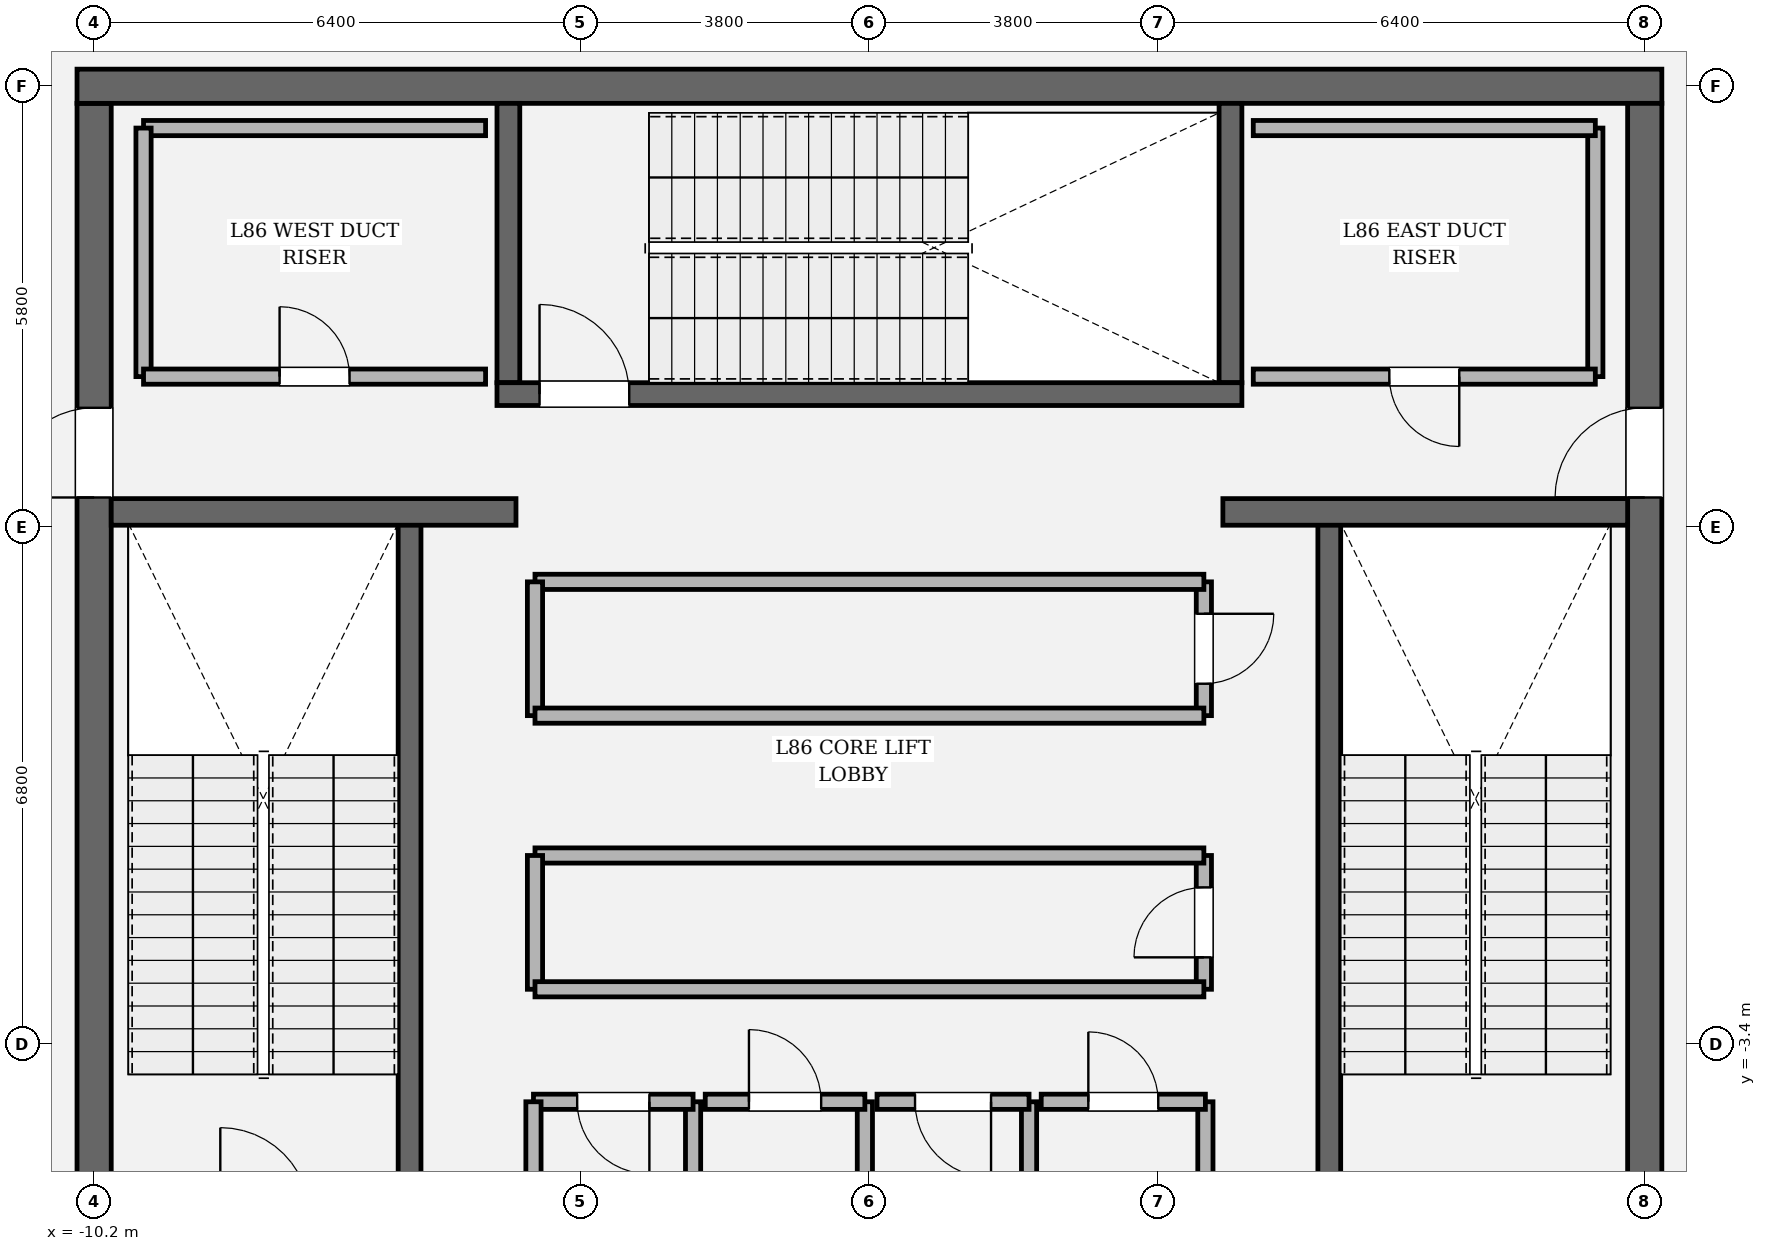
"""IFC4 building model, lengths in metres.
Left out: names, types, materials, properties, quantities, classifications, styles, units other than length and angle.
Written with IfcOpenShell. Run it as: python <this file> out.ifc"""

import sys

from ifc_helpers import new_model, si_unit, direction, frame, frame_2d, origin, place, context, subcontext, project, spatial, rectangle, extrude, element, fill, save


model = new_model("IFC4")
c1 = context("Model", 3, precision=1e-05, world=origin(), true_north=direction((0.0, 1.0)))
c2 = subcontext(c1, "Body", "Model", "MODEL_VIEW")
j1 = project(units=[si_unit("LENGTHUNIT", "METRE"), si_unit("PLANEANGLEUNIT", "RADIAN")], contexts=[c1])
p1 = place(None, origin())
s1 = spatial("IfcSite", under=j1, at=p1, CompositionType="ELEMENT")
p2 = place(p1, origin())
s2 = spatial("IfcBuilding", under=s1, at=p2, CompositionType="ELEMENT")
p3 = place(p2, frame((0.0, 0.0, 366.3)))
s3 = spatial("IfcBuildingStorey", under=s2, at=p3, CompositionType="ELEMENT", Elevation=366.3)
p4 = place(p3, frame((-10.2, -8.975, 0.0), z_axis=(0.0, 0.0, 1.0), x_axis=(0.0, 1.0, 0.0)))
e1 = element("IfcWall", 1, at=p4, inside=s3, PredefinedType="SHEAR", context=c2, shape_type="SweptSolid", body=[
    extrude(rectangle(XDim=17.95, YDim=0.45, at=frame_2d((8.975, 0.0))), origin(), (0.0, 0.0, 1.0), 4.5),
])
p5 = place(p4, frame((12.765, 0.0, 0.0)))
e2 = element("IfcOpeningElement", 2, at=p5, cuts=e1, PredefinedType="OPENING", context=c2, shape_type="SweptSolid", body=[
    extrude(rectangle(XDim=1.18, YDim=2.2, at=frame_2d((0.59, 1.1))), frame((0.0, 0.235, 0.0), z_axis=(0.0, -1.0, 0.0), x_axis=(1.0, 0.0, 0.0)), (0.0, 0.0, 1.0), 0.47),
])
p6 = place(p3, frame((-10.425, 9.2, 0.0), z_axis=(0.0, 0.0, 1.0), x_axis=(1.0, 0.0, 0.0)))
e3 = element("IfcWall", 3, at=p6, inside=s3, PredefinedType="SHEAR", context=c2, shape_type="SweptSolid", body=[
    extrude(rectangle(XDim=20.85, YDim=0.45, at=frame_2d((10.425, 0.0))), origin(), (0.0, 0.0, 1.0), 4.5),
])
p7 = place(p3, frame((10.2, 8.975, 0.0), z_axis=(0.0, 0.0, 1.0), x_axis=(0.0, -1.0, 0.0)))
e4 = element("IfcWall", 4, at=p7, inside=s3, PredefinedType="SHEAR", context=c2, shape_type="SweptSolid", body=[
    extrude(rectangle(XDim=17.95, YDim=0.45, at=frame_2d((8.975, 0.0))), origin(), (0.0, 0.0, 1.0), 4.5),
])
p8 = place(p7, frame((4.005, 0.0, 0.0)))
e5 = element("IfcOpeningElement", 5, at=p8, cuts=e4, PredefinedType="OPENING", context=c2, shape_type="SweptSolid", body=[
    extrude(rectangle(XDim=1.18, YDim=2.2, at=frame_2d((0.59, 1.1))), frame((0.0, 0.235, 0.0), z_axis=(0.0, -1.0, 0.0), x_axis=(1.0, 0.0, 0.0)), (0.0, 0.0, 1.0), 0.47),
])
for number, where, z_axis, x_axis in (
    (6, (-6.05, -5.5, 0.0), (0.0, 0.0, 1.0), (0.0, 1.0, 0.0)),
    (7, (6.05, 3.45, 0.0), (0.0, 0.0, 1.0), (0.0, -1.0, 0.0)),
):
    element("IfcWall", number, at=place(p3, frame(where, z_axis=z_axis, x_axis=x_axis)), inside=s3, PredefinedType="SOLIDWALL", context=c2, shape_type="SweptSolid", body=[
        extrude(rectangle(XDim=8.95, YDim=0.3, at=frame_2d((4.475, 0.0))), origin(), (0.0, 0.0, 1.0), 4.5),
    ])
for number, where, z_axis, x_axis in (
    (8, (-4.75, 5.3, 0.0), (0.0, 0.0, 1.0), (0.0, 1.0, 0.0)),
    (9, (4.75, 8.975, 0.0), (0.0, 0.0, 1.0), (0.0, -1.0, 0.0)),
):
    element("IfcWall", number, at=place(p3, frame(where, z_axis=z_axis, x_axis=x_axis)), inside=s3, PredefinedType="SOLIDWALL", context=c2, shape_type="SweptSolid", body=[
        extrude(rectangle(XDim=3.675, YDim=0.3, at=frame_2d((1.837, 0.0))), origin(), (0.0, 0.0, 1.0), 4.5),
    ])
p9 = place(p3, frame((-4.9, 5.15, 0.0), z_axis=(0.0, 0.0, 1.0), x_axis=(1.0, 0.0, 0.0)))
e10 = element("IfcWall", 10, at=p9, inside=s3, PredefinedType="SOLIDWALL", context=c2, shape_type="SweptSolid", body=[
    extrude(rectangle(XDim=9.8, YDim=0.3, at=frame_2d((4.9, 0.0))), origin(), (0.0, 0.0, 1.0), 4.5),
])
p10 = place(p9, frame((0.56, 0.0, 0.0)))
e11 = element("IfcOpeningElement", 11, at=p10, cuts=e10, PredefinedType="OPENING", context=c2, shape_type="SweptSolid", body=[
    extrude(rectangle(XDim=1.18, YDim=2.2, at=frame_2d((0.59, 1.1))), frame((0.0, 0.16, 0.0), z_axis=(0.0, -1.0, 0.0), x_axis=(1.0, 0.0, 0.0)), (0.0, 0.0, 1.0), 0.32),
])
for number, where, z_axis, x_axis in (
    (12, (-9.975, 3.6, 0.0), (0.0, 0.0, 1.0), (1.0, 0.0, 0.0)),
    (13, (4.65, 3.6, 0.0), (0.0, 0.0, 1.0), (1.0, 0.0, 0.0)),
):
    element("IfcWall", number, at=place(p3, frame(where, z_axis=z_axis, x_axis=x_axis)), inside=s3, PredefinedType="SOLIDWALL", context=c2, shape_type="SweptSolid", body=[
        extrude(rectangle(XDim=5.325, YDim=0.35, at=frame_2d((2.663, 0.0))), origin(), (0.0, 0.0, 1.0), 4.5),
    ])
p11 = place(p3, frame((-2.32, -5.9, 0.0), z_axis=(0.0, 0.0, 1.0), x_axis=(0.0, 1.0, 0.0)))
e14 = element("IfcWall", 14, at=p11, inside=s3, PredefinedType="SOLIDWALL", context=c2, shape_type="SweptSolid", body=[
    extrude(rectangle(XDim=1.74, YDim=0.2, at=frame_2d((0.87, 0.0))), origin(), (0.0, 0.0, 1.0), 4.25),
])
p12 = place(p3, frame((-2.32, -4.16, 0.0), z_axis=(0.0, 0.0, 1.0), x_axis=(-1.0, 0.0, 0.0)))
e15 = element("IfcWall", 15, at=p12, inside=s3, PredefinedType="SOLIDWALL", context=c2, shape_type="SweptSolid", body=[
    extrude(rectangle(XDim=2.1, YDim=0.2, at=frame_2d((1.05, 0.0))), origin(), (0.0, 0.0, 1.0), 4.25),
])
p13 = place(p12, frame((0.575, 0.0, 0.0)))
e16 = element("IfcOpeningElement", 16, at=p13, cuts=e15, PredefinedType="OPENING", context=c2, shape_type="SweptSolid", body=[
    extrude(rectangle(XDim=0.95, YDim=2.15, at=frame_2d((0.475, 1.075))), frame((0.0, 0.11, 0.0), z_axis=(0.0, -1.0, 0.0), x_axis=(1.0, 0.0, 0.0)), (0.0, 0.0, 1.0), 0.22),
])
for number, where, z_axis, x_axis in (
    (17, (-4.42, -4.16, 0.0), (0.0, 0.0, 1.0), (0.0, -1.0, 0.0)),
    (18, (-0.06, -5.9, 0.0), (0.0, 0.0, 1.0), (0.0, 1.0, 0.0)),
):
    element("IfcWall", number, at=place(p3, frame(where, z_axis=z_axis, x_axis=x_axis)), inside=s3, PredefinedType="SOLIDWALL", context=c2, shape_type="SweptSolid", body=[
        extrude(rectangle(XDim=1.74, YDim=0.2, at=frame_2d((0.87, 0.0))), origin(), (0.0, 0.0, 1.0), 4.25),
    ])
p14 = place(p3, frame((-0.06, -4.16, 0.0), z_axis=(0.0, 0.0, 1.0), x_axis=(-1.0, 0.0, 0.0)))
e19 = element("IfcWall", 19, at=p14, inside=s3, PredefinedType="SOLIDWALL", context=c2, shape_type="SweptSolid", body=[
    extrude(rectangle(XDim=2.1, YDim=0.2, at=frame_2d((1.05, 0.0))), origin(), (0.0, 0.0, 1.0), 4.25),
])
p15 = place(p14, frame((0.575, 0.0, 0.0)))
e20 = element("IfcOpeningElement", 20, at=p15, cuts=e19, PredefinedType="OPENING", context=c2, shape_type="SweptSolid", body=[
    extrude(rectangle(XDim=0.95, YDim=2.15, at=frame_2d((0.475, 1.075))), frame((0.0, 0.11, 0.0), z_axis=(0.0, -1.0, 0.0), x_axis=(1.0, 0.0, 0.0)), (0.0, 0.0, 1.0), 0.22),
])
p16 = place(p3, frame((2.1, -5.9, 0.0), z_axis=(0.0, 0.0, 1.0), x_axis=(0.0, 1.0, 0.0)))
e21 = element("IfcWall", 21, at=p16, inside=s3, PredefinedType="SOLIDWALL", context=c2, shape_type="SweptSolid", body=[
    extrude(rectangle(XDim=1.74, YDim=0.2, at=frame_2d((0.87, 0.0))), origin(), (0.0, 0.0, 1.0), 4.25),
])
p17 = place(p3, frame((2.1, -4.16, 0.0), z_axis=(0.0, 0.0, 1.0), x_axis=(-1.0, 0.0, 0.0)))
e22 = element("IfcWall", 22, at=p17, inside=s3, PredefinedType="SOLIDWALL", context=c2, shape_type="SweptSolid", body=[
    extrude(rectangle(XDim=2.0, YDim=0.2, at=frame_2d((1.0, 0.0))), origin(), (0.0, 0.0, 1.0), 4.25),
])
p18 = place(p17, frame((0.5, 0.0, 0.0)))
e23 = element("IfcOpeningElement", 23, at=p18, cuts=e22, PredefinedType="OPENING", context=c2, shape_type="SweptSolid", body=[
    extrude(rectangle(XDim=1.0, YDim=2.15, at=frame_2d((0.5, 1.075))), frame((0.0, 0.11, 0.0), z_axis=(0.0, -1.0, 0.0), x_axis=(1.0, 0.0, 0.0)), (0.0, 0.0, 1.0), 0.22),
])
p19 = place(p3, frame((4.42, -5.9, 0.0), z_axis=(0.0, 0.0, 1.0), x_axis=(0.0, 1.0, 0.0)))
e24 = element("IfcWall", 24, at=p19, inside=s3, PredefinedType="SOLIDWALL", context=c2, shape_type="SweptSolid", body=[
    extrude(rectangle(XDim=1.74, YDim=0.2, at=frame_2d((0.87, 0.0))), origin(), (0.0, 0.0, 1.0), 4.25),
])
p20 = place(p3, frame((4.42, -4.16, 0.0), z_axis=(0.0, 0.0, 1.0), x_axis=(-1.0, 0.0, 0.0)))
e25 = element("IfcWall", 25, at=p20, inside=s3, PredefinedType="SOLIDWALL", context=c2, shape_type="SweptSolid", body=[
    extrude(rectangle(XDim=2.16, YDim=0.2, at=frame_2d((1.08, 0.0))), origin(), (0.0, 0.0, 1.0), 4.25),
])
p21 = place(p20, frame((0.62, 0.0, 0.0)))
e26 = element("IfcOpeningElement", 26, at=p21, cuts=e25, PredefinedType="OPENING", context=c2, shape_type="SweptSolid", body=[
    extrude(rectangle(XDim=0.92, YDim=2.1, at=frame_2d((0.46, 1.05))), frame((0.0, 0.11, 0.0), z_axis=(0.0, -1.0, 0.0), x_axis=(1.0, 0.0, 0.0)), (0.0, 0.0, 1.0), 0.22),
])
p22 = place(p3, frame((4.4, -2.68, 0.0), z_axis=(0.0, 0.0, 1.0), x_axis=(0.0, 1.0, 0.0)))
e27 = element("IfcWall", 27, at=p22, inside=s3, PredefinedType="SOLIDWALL", context=c2, shape_type="SweptSolid", body=[
    extrude(rectangle(XDim=1.76, YDim=0.2, at=frame_2d((0.88, 0.0))), origin(), (0.0, 0.0, 1.0), 4.25),
])
p23 = place(p22, frame((0.42, 0.0, 0.0)))
e28 = element("IfcOpeningElement", 28, at=p23, cuts=e27, PredefinedType="OPENING", context=c2, shape_type="SweptSolid", body=[
    extrude(rectangle(XDim=0.92, YDim=2.1, at=frame_2d((0.46, 1.05))), frame((0.0, 0.11, 0.0), z_axis=(0.0, -1.0, 0.0), x_axis=(1.0, 0.0, 0.0)), (0.0, 0.0, 1.0), 0.22),
])
p24 = place(p3, frame((4.4, -0.92, 0.0), z_axis=(0.0, 0.0, 1.0), x_axis=(-1.0, 0.0, 0.0)))
e29 = element("IfcWall", 29, at=p24, inside=s3, PredefinedType="SOLIDWALL", context=c2, shape_type="SweptSolid", body=[
    extrude(rectangle(XDim=8.8, YDim=0.2, at=frame_2d((4.4, 0.0))), origin(), (0.0, 0.0, 1.0), 4.25),
])
p25 = place(p3, frame((-4.4, -0.92, 0.0), z_axis=(0.0, 0.0, 1.0), x_axis=(0.0, -1.0, 0.0)))
e30 = element("IfcWall", 30, at=p25, inside=s3, PredefinedType="SOLIDWALL", context=c2, shape_type="SweptSolid", body=[
    extrude(rectangle(XDim=1.76, YDim=0.2, at=frame_2d((0.88, 0.0))), origin(), (0.0, 0.0, 1.0), 4.25),
])
p26 = place(p3, frame((-4.4, -2.68, 0.0), z_axis=(0.0, 0.0, 1.0), x_axis=(1.0, 0.0, 0.0)))
e31 = element("IfcWall", 31, at=p26, inside=s3, PredefinedType="SOLIDWALL", context=c2, shape_type="SweptSolid", body=[
    extrude(rectangle(XDim=8.8, YDim=0.2, at=frame_2d((4.4, 0.0))), origin(), (0.0, 0.0, 1.0), 4.25),
])
p27 = place(p3, frame((4.4, 0.92, 0.0), z_axis=(0.0, 0.0, 1.0), x_axis=(0.0, 1.0, 0.0)))
e32 = element("IfcWall", 32, at=p27, inside=s3, PredefinedType="SOLIDWALL", context=c2, shape_type="SweptSolid", body=[
    extrude(rectangle(XDim=1.76, YDim=0.2, at=frame_2d((0.88, 0.0))), origin(), (0.0, 0.0, 1.0), 4.25),
])
p28 = place(p27, frame((0.42, 0.0, 0.0)))
e33 = element("IfcOpeningElement", 33, at=p28, cuts=e32, PredefinedType="OPENING", context=c2, shape_type="SweptSolid", body=[
    extrude(rectangle(XDim=0.92, YDim=2.1, at=frame_2d((0.46, 1.05))), frame((0.0, 0.11, 0.0), z_axis=(0.0, -1.0, 0.0), x_axis=(1.0, 0.0, 0.0)), (0.0, 0.0, 1.0), 0.22),
])
p29 = place(p3, frame((4.4, 2.68, 0.0), z_axis=(0.0, 0.0, 1.0), x_axis=(-1.0, 0.0, 0.0)))
e34 = element("IfcWall", 34, at=p29, inside=s3, PredefinedType="SOLIDWALL", context=c2, shape_type="SweptSolid", body=[
    extrude(rectangle(XDim=8.8, YDim=0.2, at=frame_2d((4.4, 0.0))), origin(), (0.0, 0.0, 1.0), 4.25),
])
p30 = place(p3, frame((-4.4, 2.68, 0.0), z_axis=(0.0, 0.0, 1.0), x_axis=(0.0, -1.0, 0.0)))
e35 = element("IfcWall", 35, at=p30, inside=s3, PredefinedType="SOLIDWALL", context=c2, shape_type="SweptSolid", body=[
    extrude(rectangle(XDim=1.76, YDim=0.2, at=frame_2d((0.88, 0.0))), origin(), (0.0, 0.0, 1.0), 4.25),
])
p31 = place(p3, frame((-4.4, 0.92, 0.0), z_axis=(0.0, 0.0, 1.0), x_axis=(1.0, 0.0, 0.0)))
e36 = element("IfcWall", 36, at=p31, inside=s3, PredefinedType="SOLIDWALL", context=c2, shape_type="SweptSolid", body=[
    extrude(rectangle(XDim=8.8, YDim=0.2, at=frame_2d((4.4, 0.0))), origin(), (0.0, 0.0, 1.0), 4.25),
])
p32 = place(p3, frame((-5.05, 8.65, 0.0), z_axis=(0.0, 0.0, 1.0), x_axis=(-1.0, 0.0, 0.0)))
e37 = element("IfcWall", 37, at=p32, inside=s3, PredefinedType="SOLIDWALL", context=c2, shape_type="SweptSolid", body=[
    extrude(rectangle(XDim=4.5, YDim=0.2, at=frame_2d((2.25, 0.0))), origin(), (0.0, 0.0, 1.0), 4.25),
])
p33 = place(p3, frame((-9.55, 8.65, 0.0), z_axis=(0.0, 0.0, 1.0), x_axis=(0.0, -1.0, 0.0)))
e38 = element("IfcWall", 38, at=p33, inside=s3, PredefinedType="SOLIDWALL", context=c2, shape_type="SweptSolid", body=[
    extrude(rectangle(XDim=3.27, YDim=0.2, at=frame_2d((1.635, 0.0))), origin(), (0.0, 0.0, 1.0), 4.25),
])
p34 = place(p3, frame((-9.55, 5.38, 0.0), z_axis=(0.0, 0.0, 1.0), x_axis=(1.0, 0.0, 0.0)))
e39 = element("IfcWall", 39, at=p34, inside=s3, PredefinedType="SOLIDWALL", context=c2, shape_type="SweptSolid", body=[
    extrude(rectangle(XDim=4.5, YDim=0.2, at=frame_2d((2.25, 0.0))), origin(), (0.0, 0.0, 1.0), 4.25),
])
p35 = place(p34, frame((1.79, 0.0, 0.0)))
e40 = element("IfcOpeningElement", 40, at=p35, cuts=e39, PredefinedType="OPENING", context=c2, shape_type="SweptSolid", body=[
    extrude(rectangle(XDim=0.92, YDim=2.1, at=frame_2d((0.46, 1.05))), frame((0.0, 0.11, 0.0), z_axis=(0.0, -1.0, 0.0), x_axis=(1.0, 0.0, 0.0)), (0.0, 0.0, 1.0), 0.22),
])
p36 = place(p3, frame((9.55, 5.38, 0.0), z_axis=(0.0, 0.0, 1.0), x_axis=(0.0, 1.0, 0.0)))
e41 = element("IfcWall", 41, at=p36, inside=s3, PredefinedType="SOLIDWALL", context=c2, shape_type="SweptSolid", body=[
    extrude(rectangle(XDim=3.27, YDim=0.2, at=frame_2d((1.635, 0.0))), origin(), (0.0, 0.0, 1.0), 4.25),
])
p37 = place(p3, frame((9.55, 8.65, 0.0), z_axis=(0.0, 0.0, 1.0), x_axis=(-1.0, 0.0, 0.0)))
e42 = element("IfcWall", 42, at=p37, inside=s3, PredefinedType="SOLIDWALL", context=c2, shape_type="SweptSolid", body=[
    extrude(rectangle(XDim=4.5, YDim=0.2, at=frame_2d((2.25, 0.0))), origin(), (0.0, 0.0, 1.0), 4.25),
])
p38 = place(p3, frame((5.05, 5.38, 0.0), z_axis=(0.0, 0.0, 1.0), x_axis=(1.0, 0.0, 0.0)))
e43 = element("IfcWall", 43, at=p38, inside=s3, PredefinedType="SOLIDWALL", context=c2, shape_type="SweptSolid", body=[
    extrude(rectangle(XDim=4.5, YDim=0.2, at=frame_2d((2.25, 0.0))), origin(), (0.0, 0.0, 1.0), 4.25),
])
p39 = place(p38, frame((1.79, 0.0, 0.0)))
e44 = element("IfcOpeningElement", 44, at=p39, cuts=e43, PredefinedType="OPENING", context=c2, shape_type="SweptSolid", body=[
    extrude(rectangle(XDim=0.92, YDim=2.1, at=frame_2d((0.46, 1.05))), frame((0.0, 0.11, 0.0), z_axis=(0.0, -1.0, 0.0), x_axis=(1.0, 0.0, 0.0)), (0.0, 0.0, 1.0), 0.22),
])
p40 = place(p10, origin())
e45 = element("IfcDoor", 45, at=p40, inside=s3, OperationType="SINGLE_SWING_LEFT", PredefinedType="DOOR", context=c2, shape_type="SweptSolid", body=[
    extrude(rectangle(XDim=1.18, YDim=2.2, at=frame_2d((0.59, 1.1))), frame((0.0, 0.025, 0.0), z_axis=(0.0, -1.0, 0.0), x_axis=(1.0, 0.0, 0.0)), (0.0, 0.0, 1.0), 0.05),
])
fill(e11, e45)
p41 = place(p5, origin())
e46 = element("IfcDoor", 46, at=p41, inside=s3, OperationType="SINGLE_SWING_LEFT", PredefinedType="DOOR", context=c2, shape_type="SweptSolid", body=[
    extrude(rectangle(XDim=1.18, YDim=2.2, at=frame_2d((0.59, 1.1))), frame((0.0, 0.025, 0.0), z_axis=(0.0, -1.0, 0.0), x_axis=(1.0, 0.0, 0.0)), (0.0, 0.0, 1.0), 0.05),
])
fill(e2, e46)
p42 = place(p8, origin())
e47 = element("IfcDoor", 47, at=p42, inside=s3, OperationType="SINGLE_SWING_RIGHT", PredefinedType="DOOR", context=c2, shape_type="SweptSolid", body=[
    extrude(rectangle(XDim=1.18, YDim=2.2, at=frame_2d((0.59, 1.1))), frame((0.0, 0.025, 0.0), z_axis=(0.0, -1.0, 0.0), x_axis=(1.0, 0.0, 0.0)), (0.0, 0.0, 1.0), 0.05),
])
fill(e5, e47)
p43 = place(p13, origin())
e48 = element("IfcDoor", 48, at=p43, inside=s3, OperationType="SINGLE_SWING_LEFT", PredefinedType="DOOR", context=c2, shape_type="SweptSolid", body=[
    extrude(rectangle(XDim=0.95, YDim=2.15, at=frame_2d((0.475, 1.075))), frame((0.0, 0.025, 0.0), z_axis=(0.0, -1.0, 0.0), x_axis=(1.0, 0.0, 0.0)), (0.0, 0.0, 1.0), 0.05),
])
fill(e16, e48)
p44 = place(p15, origin())
e49 = element("IfcDoor", 49, at=p44, inside=s3, OperationType="SINGLE_SWING_RIGHT", PredefinedType="DOOR", context=c2, shape_type="SweptSolid", body=[
    extrude(rectangle(XDim=0.95, YDim=2.15, at=frame_2d((0.475, 1.075))), frame((0.0, 0.025, 0.0), z_axis=(0.0, -1.0, 0.0), x_axis=(1.0, 0.0, 0.0)), (0.0, 0.0, 1.0), 0.05),
])
fill(e20, e49)
p45 = place(p18, origin())
e50 = element("IfcDoor", 50, at=p45, inside=s3, OperationType="SINGLE_SWING_LEFT", PredefinedType="DOOR", context=c2, shape_type="SweptSolid", body=[
    extrude(rectangle(XDim=1.0, YDim=2.15, at=frame_2d((0.5, 1.075))), frame((0.0, 0.025, 0.0), z_axis=(0.0, -1.0, 0.0), x_axis=(1.0, 0.0, 0.0)), (0.0, 0.0, 1.0), 0.05),
])
fill(e23, e50)
p46 = place(p21, origin())
e51 = element("IfcDoor", 51, at=p46, inside=s3, OperationType="SINGLE_SWING_RIGHT", PredefinedType="DOOR", context=c2, shape_type="SweptSolid", body=[
    extrude(rectangle(XDim=0.92, YDim=2.1, at=frame_2d((0.46, 1.05))), frame((0.0, 0.025, 0.0), z_axis=(0.0, -1.0, 0.0), x_axis=(1.0, 0.0, 0.0)), (0.0, 0.0, 1.0), 0.05),
])
fill(e26, e51)
p47 = place(p23, origin())
e52 = element("IfcDoor", 52, at=p47, inside=s3, OperationType="SINGLE_SWING_LEFT", PredefinedType="DOOR", context=c2, shape_type="SweptSolid", body=[
    extrude(rectangle(XDim=0.92, YDim=2.1, at=frame_2d((0.46, 1.05))), frame((0.0, 0.025, 0.0), z_axis=(0.0, -1.0, 0.0), x_axis=(1.0, 0.0, 0.0)), (0.0, 0.0, 1.0), 0.05),
])
fill(e28, e52)
p48 = place(p28, origin())
e53 = element("IfcDoor", 53, at=p48, inside=s3, OperationType="SINGLE_SWING_RIGHT", PredefinedType="DOOR", context=c2, shape_type="SweptSolid", body=[
    extrude(rectangle(XDim=0.92, YDim=2.1, at=frame_2d((0.46, 1.05))), frame((0.0, 0.025, 0.0), z_axis=(0.0, -1.0, 0.0), x_axis=(1.0, 0.0, 0.0)), (0.0, 0.0, 1.0), 0.05),
])
fill(e33, e53)
p49 = place(p35, origin())
e54 = element("IfcDoor", 54, at=p49, inside=s3, OperationType="SINGLE_SWING_LEFT", PredefinedType="DOOR", context=c2, shape_type="SweptSolid", body=[
    extrude(rectangle(XDim=0.92, YDim=2.1, at=frame_2d((0.46, 1.05))), frame((0.0, 0.025, 0.0), z_axis=(0.0, -1.0, 0.0), x_axis=(1.0, 0.0, 0.0)), (0.0, 0.0, 1.0), 0.05),
])
fill(e40, e54)
p50 = place(p39, origin())
e55 = element("IfcDoor", 55, at=p50, inside=s3, OperationType="SINGLE_SWING_RIGHT", PredefinedType="DOOR", context=c2, shape_type="SweptSolid", body=[
    extrude(rectangle(XDim=0.92, YDim=2.1, at=frame_2d((0.46, 1.05))), frame((0.0, 0.025, 0.0), z_axis=(0.0, -1.0, 0.0), x_axis=(1.0, 0.0, 0.0)), (0.0, 0.0, 1.0), 0.05),
])
fill(e44, e55)
save(model, sys.argv[1])
